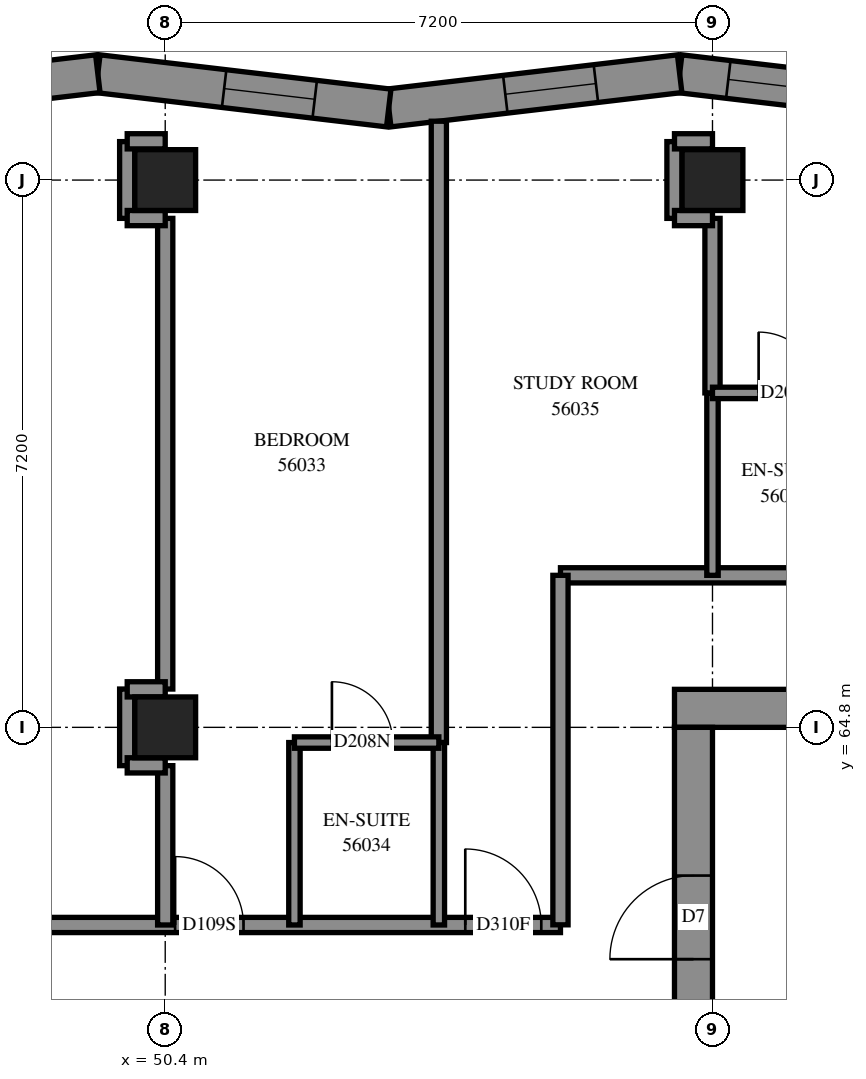
"""IFC4 building model, lengths in metres.
Left out: names, types, materials, properties, quantities, classifications, styles, units other than length and angle.
Written with IfcOpenShell. Run it as: python <this file> out.ifc"""

import sys

from ifc_helpers import new_model, si_unit, direction, frame, frame_2d, origin, origin_2d, place, context, subcontext, project, spatial, polyline, rectangle, outline, extrude, element, fill, save


model = new_model("IFC4")
c1 = context("Model", 3, precision=1e-05, world=origin(), true_north=direction((0.0, 1.0)))
c2 = subcontext(c1, "Body", "Model", "MODEL_VIEW")
j1 = project(units=[si_unit("LENGTHUNIT", "METRE"), si_unit("PLANEANGLEUNIT", "RADIAN")], contexts=[c1])
p1 = place(None, origin())
s1 = spatial("IfcSite", under=j1, at=p1, CompositionType="ELEMENT")
p2 = place(p1, origin())
s2 = spatial("IfcBuilding", under=s1, at=p2, CompositionType="ELEMENT")
p3 = place(p2, frame((0.0, 0.0, 206.6)))
s3 = spatial("IfcBuildingStorey", under=s2, at=p3, CompositionType="ELEMENT", Elevation=206.6)
for number, where, z_axis, x_axis in (
    (1, (50.4, 64.8, 0.0), (0.0, 0.0, 1.0), (1.0, 0.0, 0.0)),
    (2, (50.4, 72.0, 0.0), (0.0, 0.0, 1.0), (1.0, 0.0, 0.0)),
    (3, (57.6, 72.0, 0.0), (0.0, 0.0, 1.0), (1.0, 0.0, 0.0)),
):
    element("IfcColumn", number, at=place(p3, frame(where, z_axis=z_axis, x_axis=x_axis)), inside=s3, PredefinedType="COLUMN", context=c2, shape_type="SweptSolid", body=[
        extrude(rectangle(XDim=0.8, YDim=0.8, at=origin_2d()), origin(), (0.0, 0.0, 1.0), 3.1),
    ])
p4 = place(p3, frame((57.1, 65.05, -0.3), z_axis=(0.0, 0.0, 1.0), x_axis=(1.0, 0.0, 0.0)))
e4 = element("IfcWall", 4, at=p4, inside=s3, PredefinedType="SHEAR", context=c2, shape_type="SweptSolid", body=[
    extrude(rectangle(XDim=15.4, YDim=0.5, at=frame_2d((7.7, 0.0))), origin(), (0.0, 0.0, 1.0), 2.7),
])
p5 = place(p4, frame((10.5, 0.0, 0.3)))
e5 = element("IfcOpeningElement", 5, at=p5, cuts=e4, PredefinedType="OPENING", context=c2, shape_type="SweptSolid", body=[
    extrude(rectangle(XDim=0.8, YDim=2.1, at=frame_2d((0.4, 1.05))), frame((0.0, 0.26, 0.0), z_axis=(0.0, -1.0, 0.0), x_axis=(1.0, 0.0, 0.0)), (0.0, 0.0, 1.0), 0.52),
])
p6 = place(p3, frame((57.35, 50.4, -0.3), z_axis=(0.0, 0.0, 1.0), x_axis=(0.0, 1.0, 0.0)))
e6 = element("IfcWall", 6, at=p6, inside=s3, PredefinedType="SHEAR", context=c2, shape_type="SweptSolid", body=[
    extrude(rectangle(XDim=14.4, YDim=0.5, at=frame_2d((7.2, 0.0))), origin(), (0.0, 0.0, 1.0), 2.7),
])
p7 = place(p6, frame((4.55, 0.0, 0.3)))
e7 = element("IfcOpeningElement", 7, at=p7, cuts=e6, PredefinedType="OPENING", context=c2, shape_type="SweptSolid", body=[
    extrude(rectangle(XDim=1.1, YDim=2.1, at=frame_2d((0.55, 1.05))), frame((0.0, 0.26, 0.0), z_axis=(0.0, -1.0, 0.0), x_axis=(1.0, 0.0, 0.0)), (0.0, 0.0, 1.0), 0.52),
])
p8 = place(p6, frame((11.35, 0.0, 0.3)))
e8 = element("IfcOpeningElement", 8, at=p8, cuts=e6, PredefinedType="OPENING", context=c2, shape_type="SweptSolid", body=[
    extrude(rectangle(XDim=1.1, YDim=2.1, at=frame_2d((0.55, 1.05))), frame((0.0, 0.26, 0.0), z_axis=(0.0, -1.0, 0.0), x_axis=(1.0, 0.0, 0.0)), (0.0, 0.0, 1.0), 0.52),
])
p9 = place(p3, frame((60.995, 72.948, 0.0), z_axis=(0.0, 0.0, 1.0), x_axis=(-0.9931289789, 0.1170249176, 0.0)))
e9 = element("IfcWall", 9, at=p9, inside=s3, PredefinedType="SOLIDWALL", context=c2, shape_type="SweptSolid", body=[
    extrude(outline(polyline([(0.029, -0.25), (3.883, -0.25), (3.824, 0.25), (-0.029, 0.25), (0.029, -0.25)])), origin(), (0.0, 0.0, 1.0), 3.1),
])
p10 = place(p9, frame((0.409, 0.0, 0.45)))
e10 = element("IfcOpeningElement", 10, at=p10, cuts=e9, PredefinedType="OPENING", context=c2, shape_type="SweptSolid", body=[
    extrude(rectangle(XDim=1.3, YDim=2.5, at=frame_2d((0.65, 1.25))), frame((0.0, 0.26, 0.0), z_axis=(0.0, -1.0, 0.0), x_axis=(1.0, 0.0, 0.0)), (0.0, 0.0, 1.0), 0.52),
])
p11 = place(p9, frame((1.909, 0.0, 0.45)))
e11 = element("IfcOpeningElement", 11, at=p11, cuts=e9, PredefinedType="OPENING", context=c2, shape_type="SweptSolid", body=[
    extrude(rectangle(XDim=1.3, YDim=2.5, at=frame_2d((0.65, 1.25))), frame((0.0, 0.26, 0.0), z_axis=(0.0, -1.0, 0.0), x_axis=(1.0, 0.0, 0.0)), (0.0, 0.0, 1.0), 0.52),
])
p12 = place(p3, frame((57.168, 73.399, 0.0), z_axis=(0.0, 0.0, 1.0), x_axis=(-0.9931289789, -0.1170249176, 0.0)))
e12 = element("IfcWall", 12, at=p12, inside=s3, PredefinedType="SOLIDWALL", context=c2, shape_type="SweptSolid", body=[
    extrude(outline(polyline([(-0.029, -0.25), (3.824, -0.25), (3.883, 0.25), (0.029, 0.25), (-0.029, -0.25)])), origin(), (0.0, 0.0, 1.0), 3.1),
])
p13 = place(p12, frame((1.11, 0.0, 0.45)))
e13 = element("IfcOpeningElement", 13, at=p13, cuts=e12, PredefinedType="OPENING", context=c2, shape_type="SweptSolid", body=[
    extrude(rectangle(XDim=1.2, YDim=2.5, at=frame_2d((0.6, 1.25))), frame((0.0, 0.26, 0.0), z_axis=(0.0, -1.0, 0.0), x_axis=(1.0, 0.0, 0.0)), (0.0, 0.0, 1.0), 0.52),
])
p14 = place(p3, frame((53.341, 72.948, 0.0), z_axis=(0.0, 0.0, 1.0), x_axis=(-0.9931289789, 0.1170249176, 0.0)))
e14 = element("IfcWall", 14, at=p14, inside=s3, PredefinedType="SOLIDWALL", context=c2, shape_type="SweptSolid", body=[
    extrude(outline(polyline([(0.029, -0.25), (3.883, -0.25), (3.824, 0.25), (-0.029, 0.25), (0.029, -0.25)])), origin(), (0.0, 0.0, 1.0), 3.1),
])
p15 = place(p14, frame((0.981, 0.0, 0.45)))
e15 = element("IfcOpeningElement", 15, at=p15, cuts=e14, PredefinedType="OPENING", context=c2, shape_type="SweptSolid", body=[
    extrude(rectangle(XDim=1.2, YDim=2.5, at=frame_2d((0.6, 1.25))), frame((0.0, 0.26, 0.0), z_axis=(0.0, -1.0, 0.0), x_axis=(1.0, 0.0, 0.0)), (0.0, 0.0, 1.0), 0.52),
])
p16 = place(p3, frame((49.513, 73.399, 0.0), z_axis=(0.0, 0.0, 1.0), x_axis=(-0.9931289789, -0.1170249176, 0.0)))
e16 = element("IfcWall", 16, at=p16, inside=s3, PredefinedType="SOLIDWALL", context=c2, shape_type="SweptSolid", body=[
    extrude(outline(polyline([(-0.029, -0.25), (3.824, -0.25), (3.883, 0.25), (0.029, 0.25), (-0.029, -0.25)])), origin(), (0.0, 0.0, 1.0), 3.1),
])
p17 = place(p16, frame((0.881, 0.0, 0.45)))
e17 = element("IfcOpeningElement", 17, at=p17, cuts=e16, PredefinedType="OPENING", context=c2, shape_type="SweptSolid", body=[
    extrude(rectangle(XDim=1.2, YDim=2.5, at=frame_2d((0.6, 1.25))), frame((0.0, 0.26, 0.0), z_axis=(0.0, -1.0, 0.0), x_axis=(1.0, 0.0, 0.0)), (0.0, 0.0, 1.0), 0.52),
])
p18 = place(p3, frame((55.6, 66.8, 0.0), z_axis=(0.0, 0.0, 1.0), x_axis=(1.0, 0.0, 0.0)))
e18 = element("IfcWall", 18, at=p18, inside=s3, PredefinedType="PARTITIONING", context=c2, shape_type="SweptSolid", body=[
    extrude(rectangle(XDim=18.4, YDim=0.2, at=frame_2d((9.2, 0.0))), origin(), (0.0, 0.0, 1.0), 3.1),
])
p19 = place(p18, frame((4.25, 0.0, 0.0)))
e19 = element("IfcOpeningElement", 19, at=p19, cuts=e18, PredefinedType="OPENING", context=c2, shape_type="SweptSolid", body=[
    extrude(rectangle(XDim=0.9, YDim=2.1, at=frame_2d((0.45, 1.05))), frame((0.0, 0.11, 0.0), z_axis=(0.0, -1.0, 0.0), x_axis=(1.0, 0.0, 0.0)), (0.0, 0.0, 1.0), 0.22),
])
p20 = place(p18, frame((7.974, 0.0, 0.0)))
e20 = element("IfcOpeningElement", 20, at=p20, cuts=e18, PredefinedType="OPENING", context=c2, shape_type="SweptSolid", body=[
    extrude(rectangle(XDim=1.0, YDim=2.1, at=frame_2d((0.5, 1.05))), frame((0.0, 0.11, 0.0), z_axis=(0.0, -1.0, 0.0), x_axis=(1.0, 0.0, 0.0)), (0.0, 0.0, 1.0), 0.22),
])
p21 = place(p18, frame((13.2, 0.0, 0.0)))
e21 = element("IfcOpeningElement", 21, at=p21, cuts=e18, PredefinedType="OPENING", context=c2, shape_type="SweptSolid", body=[
    extrude(rectangle(XDim=0.9, YDim=2.1, at=frame_2d((0.45, 1.05))), frame((0.0, 0.11, 0.0), z_axis=(0.0, -1.0, 0.0), x_axis=(1.0, 0.0, 0.0)), (0.0, 0.0, 1.0), 0.22),
])
p22 = place(p3, frame((40.602, 62.2, 0.0), z_axis=(0.0, 0.0, 1.0), x_axis=(1.0, 0.0, 0.0)))
e22 = element("IfcWall", 22, at=p22, inside=s3, PredefinedType="PARTITIONING", context=c2, shape_type="SweptSolid", body=[
    extrude(rectangle(XDim=14.998, YDim=0.2, at=frame_2d((7.499, 0.0))), origin(), (0.0, 0.0, 1.0), 3.1),
])
p23 = place(p22, frame((6.308, 0.0, 0.0)))
e23 = element("IfcOpeningElement", 23, at=p23, cuts=e22, PredefinedType="OPENING", context=c2, shape_type="SweptSolid", body=[
    extrude(rectangle(XDim=1.0, YDim=2.1, at=frame_2d((0.5, 1.05))), frame((0.0, 0.11, 0.0), z_axis=(0.0, -1.0, 0.0), x_axis=(1.0, 0.0, 0.0)), (0.0, 0.0, 1.0), 0.22),
])
p24 = place(p22, frame((9.928, 0.0, 0.0)))
e24 = element("IfcOpeningElement", 24, at=p24, cuts=e22, PredefinedType="OPENING", context=c2, shape_type="SweptSolid", body=[
    extrude(rectangle(XDim=0.9, YDim=2.1, at=frame_2d((0.45, 1.05))), frame((0.0, 0.11, 0.0), z_axis=(0.0, -1.0, 0.0), x_axis=(1.0, 0.0, 0.0)), (0.0, 0.0, 1.0), 0.22),
])
p25 = place(p22, frame((13.746, 0.0, 0.0)))
e25 = element("IfcOpeningElement", 25, at=p25, cuts=e22, PredefinedType="OPENING", context=c2, shape_type="SweptSolid", body=[
    extrude(rectangle(XDim=1.0, YDim=2.1, at=frame_2d((0.5, 1.05))), frame((0.0, 0.11, 0.0), z_axis=(0.0, -1.0, 0.0), x_axis=(1.0, 0.0, 0.0)), (0.0, 0.0, 1.0), 0.22),
])
p26 = place(p3, frame((54.0, 64.6, 0.0), z_axis=(0.0, 0.0, 1.0), x_axis=(0.0, 1.0, 0.0)))
e26 = element("IfcWall", 26, at=p26, inside=s3, PredefinedType="PARTITIONING", context=c2, shape_type="SweptSolid", body=[
    extrude(rectangle(XDim=8.174, YDim=0.2, at=frame_2d((4.087, 0.0))), origin(), (0.0, 0.0, 1.0), 3.1),
])
p27 = place(p3, frame((50.4, 65.304, 0.0), z_axis=(0.0, 0.0, 1.0), x_axis=(0.0, 1.0, 0.0)))
e27 = element("IfcWall", 27, at=p27, inside=s3, PredefinedType="PARTITIONING", context=c2, shape_type="SweptSolid", body=[
    extrude(rectangle(XDim=6.192, YDim=0.2, at=frame_2d((3.096, 0.0))), origin(), (0.0, 0.0, 1.0), 3.1),
])
p28 = place(p3, frame((55.6, 62.202, 0.0), z_axis=(0.0, 0.0, 1.0), x_axis=(0.0, 1.0, 0.0)))
e28 = element("IfcWall", 28, at=p28, inside=s3, PredefinedType="PARTITIONING", context=c2, shape_type="SweptSolid", body=[
    extrude(rectangle(XDim=4.598, YDim=0.2, at=frame_2d((2.299, 0.0))), origin(), (0.0, 0.0, 1.0), 3.1),
])
for number, where, z_axis, x_axis in (
    (29, (57.6, 66.8, 0.0), (0.0, 0.0, 1.0), (0.0, 1.0, 0.0)),
    (30, (52.1, 62.2, 0.0), (0.0, 0.0, 1.0), (0.0, 1.0, 0.0)),
    (31, (54.0, 62.2, 0.0), (0.0, 0.0, 1.0), (0.0, 1.0, 0.0)),
):
    element("IfcWall", number, at=place(p3, frame(where, z_axis=z_axis, x_axis=x_axis)), inside=s3, PredefinedType="PARTITIONING", context=c2, shape_type="SweptSolid", body=[
        extrude(rectangle(XDim=2.4, YDim=0.15, at=frame_2d((1.2, 0.0))), origin(), (0.0, 0.0, 1.0), 3.1),
    ])
p29 = place(p3, frame((57.6, 69.2, 0.0), z_axis=(0.0, 0.0, 1.0), x_axis=(0.0, 1.0, 0.0)))
e32 = element("IfcWall", 32, at=p29, inside=s3, PredefinedType="PARTITIONING", context=c2, shape_type="SweptSolid", body=[
    extrude(rectangle(XDim=2.296, YDim=0.2, at=frame_2d((1.148, 0.0))), origin(), (0.0, 0.0, 1.0), 3.1),
])
p30 = place(p3, frame((50.4, 62.2, 0.0), z_axis=(0.0, 0.0, 1.0), x_axis=(0.0, 1.0, 0.0)))
e33 = element("IfcWall", 33, at=p30, inside=s3, PredefinedType="PARTITIONING", context=c2, shape_type="SweptSolid", body=[
    extrude(rectangle(XDim=2.096, YDim=0.2, at=frame_2d((1.048, 0.0))), origin(), (0.0, 0.0, 1.0), 3.1),
])
p31 = place(p3, frame((52.1, 64.6, 0.0), z_axis=(0.0, 0.0, 1.0), x_axis=(1.0, 0.0, 0.0)))
e34 = element("IfcWall", 34, at=p31, inside=s3, PredefinedType="PARTITIONING", context=c2, shape_type="SweptSolid", body=[
    extrude(rectangle(XDim=1.9, YDim=0.15, at=frame_2d((0.95, 0.0))), origin(), (0.0, 0.0, 1.0), 3.1),
])
p32 = place(p31, frame((0.493, 0.0, 0.0)))
e35 = element("IfcOpeningElement", 35, at=p32, cuts=e34, PredefinedType="OPENING", context=c2, shape_type="SweptSolid", body=[
    extrude(rectangle(XDim=0.8, YDim=2.1, at=frame_2d((0.4, 1.05))), frame((0.0, 0.085, 0.0), z_axis=(0.0, -1.0, 0.0), x_axis=(1.0, 0.0, 0.0)), (0.0, 0.0, 1.0), 0.17),
])
p33 = place(p3, frame((57.6, 69.2, 0.0), z_axis=(0.0, 0.0, 1.0), x_axis=(1.0, 0.0, 0.0)))
e36 = element("IfcWall", 36, at=p33, inside=s3, PredefinedType="PARTITIONING", context=c2, shape_type="SweptSolid", body=[
    extrude(rectangle(XDim=1.9, YDim=0.15, at=frame_2d((0.95, 0.0))), origin(), (0.0, 0.0, 1.0), 3.1),
])
p34 = place(p33, frame((0.607, 0.0, 0.0)))
e37 = element("IfcOpeningElement", 37, at=p34, cuts=e36, PredefinedType="OPENING", context=c2, shape_type="SweptSolid", body=[
    extrude(rectangle(XDim=0.8, YDim=2.1, at=frame_2d((0.4, 1.05))), frame((0.0, 0.085, 0.0), z_axis=(0.0, -1.0, 0.0), x_axis=(1.0, 0.0, 0.0)), (0.0, 0.0, 1.0), 0.17),
])
for number, where, z_axis, x_axis in (
    (38, (49.9, 71.496, 0.0), (0.0, 0.0, 1.0), (0.0, 1.0, 0.0)),
    (39, (57.1, 71.496, 0.0), (0.0, 0.0, 1.0), (0.0, 1.0, 0.0)),
):
    element("IfcWall", number, at=place(p3, frame(where, z_axis=z_axis, x_axis=x_axis)), inside=s3, PredefinedType="PARTITIONING", context=c2, shape_type="SweptSolid", body=[
        extrude(rectangle(XDim=1.01, YDim=0.2, at=frame_2d((0.505, 0.0))), origin(), (0.0, 0.0, 1.0), 3.1),
    ])
p35 = place(p3, frame((49.9, 64.296, 0.0), z_axis=(0.0, 0.0, 1.0), x_axis=(0.0, 1.0, 0.0)))
e40 = element("IfcWall", 40, at=p35, inside=s3, PredefinedType="PARTITIONING", context=c2, shape_type="SweptSolid", body=[
    extrude(rectangle(XDim=1.008, YDim=0.2, at=frame_2d((0.504, 0.0))), origin(), (0.0, 0.0, 1.0), 3.1),
])
for number, where, z_axis, x_axis in (
    (41, (49.9, 72.51, 0.0), (0.0, 0.0, 1.0), (1.0, 0.0, 0.0)),
    (42, (57.1, 72.51, 0.0), (0.0, 0.0, 1.0), (1.0, 0.0, 0.0)),
    (43, (49.9, 71.5, 0.0), (0.0, 0.0, 1.0), (1.0, 0.0, 0.0)),
    (44, (57.1, 71.5, 0.0), (0.0, 0.0, 1.0), (1.0, 0.0, 0.0)),
    (45, (49.9, 65.3, 0.0), (0.0, 0.0, 1.0), (1.0, 0.0, 0.0)),
    (46, (49.9, 64.3, 0.0), (0.0, 0.0, 1.0), (1.0, 0.0, 0.0)),
):
    element("IfcWall", number, at=place(p3, frame(where, z_axis=z_axis, x_axis=x_axis)), inside=s3, PredefinedType="PARTITIONING", context=c2, shape_type="SweptSolid", body=[
        extrude(rectangle(XDim=0.5, YDim=0.2, at=frame_2d((0.25, 0.0))), origin(), (0.0, 0.0, 1.0), 3.1),
    ])
p36 = place(p11, origin())
e47 = element("IfcWindow", 47, at=p36, inside=s3, PartitioningType="SINGLE_PANEL", PredefinedType="WINDOW", context=c2, shape_type="SweptSolid", body=[
    extrude(rectangle(XDim=1.3, YDim=2.5, at=frame_2d((0.65, 1.25))), frame((0.0, 0.18, 0.0), z_axis=(0.0, -1.0, 0.0), x_axis=(1.0, 0.0, 0.0)), (0.0, 0.0, 1.0), 0.06),
])
fill(e11, e47)
p37 = place(p13, origin())
e48 = element("IfcWindow", 48, at=p37, inside=s3, PartitioningType="SINGLE_PANEL", PredefinedType="WINDOW", context=c2, shape_type="SweptSolid", body=[
    extrude(rectangle(XDim=1.2, YDim=2.5, at=frame_2d((0.6, 1.25))), frame((0.0, 0.18, 0.0), z_axis=(0.0, -1.0, 0.0), x_axis=(1.0, 0.0, 0.0)), (0.0, 0.0, 1.0), 0.06),
])
fill(e13, e48)
p38 = place(p15, origin())
e49 = element("IfcWindow", 49, at=p38, inside=s3, PartitioningType="SINGLE_PANEL", PredefinedType="WINDOW", context=c2, shape_type="SweptSolid", body=[
    extrude(rectangle(XDim=1.2, YDim=2.5, at=frame_2d((0.6, 1.25))), frame((0.0, 0.18, 0.0), z_axis=(0.0, -1.0, 0.0), x_axis=(1.0, 0.0, 0.0)), (0.0, 0.0, 1.0), 0.06),
])
fill(e15, e49)
p39 = place(p8, origin())
e50 = element("IfcDoor", 50, at=p39, inside=s3, OperationType="SINGLE_SWING_LEFT", PredefinedType="DOOR", context=c2, shape_type="SweptSolid", body=[
    extrude(rectangle(XDim=1.1, YDim=2.1, at=frame_2d((0.55, 1.05))), frame((0.0, 0.025, 0.0), z_axis=(0.0, -1.0, 0.0), x_axis=(1.0, 0.0, 0.0)), (0.0, 0.0, 1.0), 0.05),
])
fill(e8, e50)
p40 = place(p34, origin())
e51 = element("IfcDoor", 51, at=p40, inside=s3, OperationType="SINGLE_SWING_RIGHT", PredefinedType="DOOR", context=c2, shape_type="SweptSolid", body=[
    extrude(rectangle(XDim=0.8, YDim=2.1, at=frame_2d((0.4, 1.05))), frame((0.0, 0.025, 0.0), z_axis=(0.0, -1.0, 0.0), x_axis=(1.0, 0.0, 0.0)), (0.0, 0.0, 1.0), 0.05),
])
fill(e37, e51)
p41 = place(p24, origin())
e52 = element("IfcDoor", 52, at=p41, inside=s3, OperationType="SINGLE_SWING_RIGHT", PredefinedType="DOOR", context=c2, shape_type="SweptSolid", body=[
    extrude(rectangle(XDim=0.9, YDim=2.1, at=frame_2d((0.45, 1.05))), frame((0.0, 0.025, 0.0), z_axis=(0.0, -1.0, 0.0), x_axis=(1.0, 0.0, 0.0)), (0.0, 0.0, 1.0), 0.05),
])
fill(e24, e52)
p42 = place(p32, origin())
e53 = element("IfcDoor", 53, at=p42, inside=s3, OperationType="SINGLE_SWING_RIGHT", PredefinedType="DOOR", context=c2, shape_type="SweptSolid", body=[
    extrude(rectangle(XDim=0.8, YDim=2.1, at=frame_2d((0.4, 1.05))), frame((0.0, 0.025, 0.0), z_axis=(0.0, -1.0, 0.0), x_axis=(1.0, 0.0, 0.0)), (0.0, 0.0, 1.0), 0.05),
])
fill(e35, e53)
p43 = place(p25, origin())
e54 = element("IfcDoor", 54, at=p43, inside=s3, OperationType="SINGLE_SWING_LEFT", PredefinedType="DOOR", context=c2, shape_type="SweptSolid", body=[
    extrude(rectangle(XDim=1.0, YDim=2.1, at=frame_2d((0.5, 1.05))), frame((0.0, 0.025, 0.0), z_axis=(0.0, -1.0, 0.0), x_axis=(1.0, 0.0, 0.0)), (0.0, 0.0, 1.0), 0.05),
])
fill(e25, e54)
save(model, sys.argv[1])
